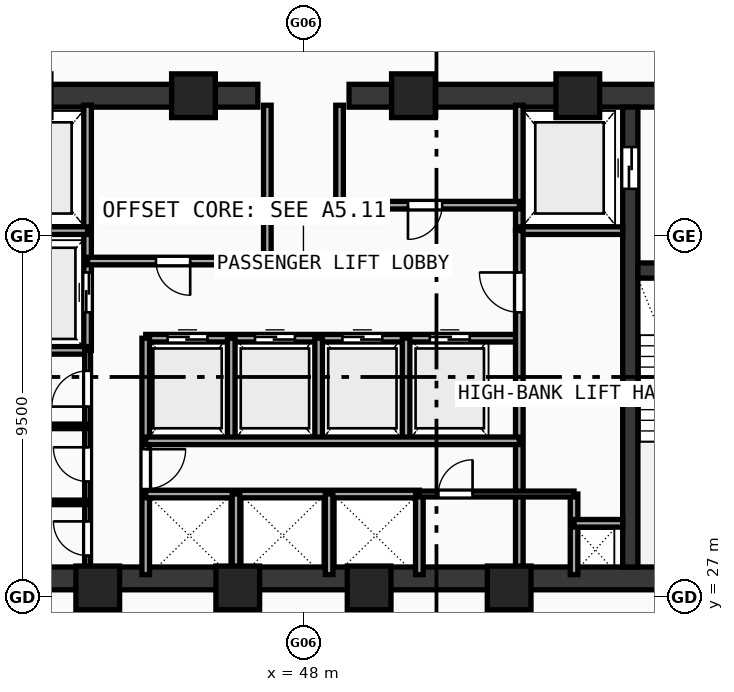
"""IFC4 building model, lengths in metres.
Left out: names, types, materials, properties, quantities, classifications, styles, units other than length and angle.
Written with IfcOpenShell. Run it as: python <this file> out.ifc"""

import sys

from ifc_helpers import new_model, si_unit, direction, frame, frame_2d, origin, origin_with_axes, origin_2d, place, context, subcontext, project, spatial, rectangle, hollow_rectangle, extrude, source, transform, mapped, element, fill, save


model = new_model("IFC4")
c1 = context("Model", 3, precision=1e-05, world=origin(), true_north=direction((0.0, 1.0)))
c2 = subcontext(c1, "Body", "Model", "MODEL_VIEW")
j1 = project(units=[si_unit("LENGTHUNIT", "METRE"), si_unit("PLANEANGLEUNIT", "RADIAN")], contexts=[c1])
p1 = place(None, origin())
s1 = spatial("IfcSite", under=j1, at=p1, CompositionType="ELEMENT")
p2 = place(p1, origin())
s2 = spatial("IfcBuilding", under=s1, at=p2, CompositionType="ELEMENT")
p3 = place(p2, frame((0.0, 0.0, 144.55)))
s3 = spatial("IfcBuildingStorey", under=s2, at=p3, CompositionType="ELEMENT", Elevation=144.55)
p4 = place(p3, frame((35.5, 27.5, 0.0), z_axis=(0.0, 0.0, 1.0), x_axis=(1.0, 0.0, 0.0)))
e1 = element("IfcWall", 1, at=p4, inside=s3, PredefinedType="SHEAR", context=c2, shape_type="SweptSolid", body=[
    extrude(rectangle(XDim=25.0, YDim=0.6, at=frame_2d((12.5, 0.0))), origin(), (0.0, 0.0, 1.0), 3.42),
])
p5 = place(p3, frame((35.5, 40.2, 0.0), z_axis=(0.0, 0.0, 1.0), x_axis=(1.0, 0.0, 0.0)))
e2 = element("IfcWall", 2, at=p5, inside=s3, PredefinedType="SHEAR", context=c2, shape_type="SweptSolid", body=[
    extrude(rectangle(XDim=11.3, YDim=0.6, at=frame_2d((5.65, 0.0))), origin(), (0.0, 0.0, 1.0), 3.42),
])
p6 = place(p5, frame((1.65, 0.0, 0.0)))
e3 = element("IfcOpeningElement", 3, at=p6, cuts=e2, PredefinedType="OPENING", context=c2, shape_type="SweptSolid", body=[
    extrude(rectangle(XDim=1.05, YDim=2.1, at=frame_2d((0.525, 1.05))), frame((0.0, 0.31, 0.0), z_axis=(0.0, -1.0, 0.0), x_axis=(1.0, 0.0, 0.0)), (0.0, 0.0, 1.0), 0.62),
])
p7 = place(p3, frame((49.2, 40.2, 0.0), z_axis=(0.0, 0.0, 1.0), x_axis=(1.0, 0.0, 0.0)))
e4 = element("IfcWall", 4, at=p7, inside=s3, PredefinedType="SHEAR", context=c2, shape_type="SweptSolid", body=[
    extrude(rectangle(XDim=11.3, YDim=0.6, at=frame_2d((5.65, 0.0))), origin(), (0.0, 0.0, 1.0), 3.42),
])
p8 = place(p7, frame((8.6, 0.0, 0.0)))
e5 = element("IfcOpeningElement", 5, at=p8, cuts=e4, PredefinedType="OPENING", context=c2, shape_type="SweptSolid", body=[
    extrude(rectangle(XDim=1.05, YDim=2.1, at=frame_2d((0.525, 1.05))), frame((0.0, 0.31, 0.0), z_axis=(0.0, -1.0, 0.0), x_axis=(1.0, 0.0, 0.0)), (0.0, 0.0, 1.0), 0.62),
])
p9 = place(p3, frame((56.6, 27.8, 0.0), z_axis=(0.0, 0.0, 1.0), x_axis=(0.0, 1.0, 0.0)))
e6 = element("IfcWall", 6, at=p9, inside=s3, PredefinedType="SHEAR", context=c2, shape_type="SweptSolid", body=[
    extrude(rectangle(XDim=12.1, YDim=0.4, at=frame_2d((6.05, 0.0))), origin(), (0.0, 0.0, 1.0), 3.42),
])
p10 = place(p9, frame((9.95, 0.0, 0.0)))
e7 = element("IfcOpeningElement", 7, at=p10, cuts=e6, PredefinedType="OPENING", context=c2, shape_type="SweptSolid", body=[
    extrude(rectangle(XDim=1.1, YDim=2.1, at=frame_2d((0.55, 1.05))), frame((0.0, 0.21, 0.0), z_axis=(0.0, -1.0, 0.0), x_axis=(1.0, 0.0, 0.0)), (0.0, 0.0, 1.0), 0.42),
])
p11 = place(p3, frame((56.8, 35.6, 0.0), z_axis=(0.0, 0.0, 1.0), x_axis=(1.0, 0.0, 0.0)))
e8 = element("IfcWall", 8, at=p11, inside=s3, PredefinedType="SHEAR", context=c2, shape_type="SweptSolid", body=[
    extrude(rectangle(XDim=3.1, YDim=0.4, at=frame_2d((1.55, 0.0))), origin(), (0.0, 0.0, 1.0), 3.42),
])
p12 = place(p11, frame((1.02, 0.0, 0.0)))
e9 = element("IfcOpeningElement", 9, at=p12, cuts=e8, PredefinedType="OPENING", context=c2, shape_type="SweptSolid", body=[
    extrude(rectangle(XDim=1.05, YDim=2.1, at=frame_2d((0.525, 1.05))), frame((0.0, 0.21, 0.0), z_axis=(0.0, -1.0, 0.0), x_axis=(1.0, 0.0, 0.0)), (0.0, 0.0, 1.0), 0.42),
])
m1 = source(origin(), c2, "Body", "SweptSolid", [
    extrude(hollow_rectangle(XDim=1.15, YDim=1.15, WallThickness=0.048, at=origin_2d()), origin(), (0.0, 0.0, 1.0), 3.68),
])
for number, where, z_axis, x_axis in (
    (10, (42.588, 27.25, -0.26), (0.0, 0.0, 1.0), (1.0, 0.0, 0.0)),
    (11, (46.272, 27.25, -0.26), (0.0, 0.0, 1.0), (1.0, 0.0, 0.0)),
    (12, (49.729, 27.25, -0.26), (0.0, 0.0, 1.0), (1.0, 0.0, 0.0)),
    (13, (53.412, 27.25, -0.26), (0.0, 0.0, 1.0), (1.0, 0.0, 0.0)),
    (14, (55.219, 40.2, -0.26), (0.0, 0.0, 1.0), (1.0, 0.0, 0.0)),
    (15, (50.894, 40.2, -0.26), (0.0, 0.0, 1.0), (1.0, 0.0, 0.0)),
    (16, (45.106, 40.2, -0.26), (0.0, 0.0, 1.0), (1.0, 0.0, 0.0)),
):
    element("IfcColumn", number, at=place(p3, frame(where, z_axis=z_axis, x_axis=x_axis)), inside=s3, PredefinedType="COLUMN", context=c2, shape_type="MappedRepresentation", body=[
        mapped(m1, transform((0.0, 0.0, 0.0), scale=1.0)),
    ])
p13 = place(p3, frame((42.32, 33.5, 0.0), z_axis=(0.0, 0.0, 1.0), x_axis=(0.0, 1.0, 0.0)))
e17 = element("IfcWall", 17, at=p13, inside=s3, PredefinedType="SOLIDWALL", context=c2, shape_type="SweptSolid", body=[
    extrude(rectangle(XDim=6.45, YDim=0.2, at=frame_2d((3.225, 0.0))), origin(), (0.0, 0.0, 1.0), 3.42),
])
p14 = place(p13, frame((1.0, 0.0, 0.0)))
e18 = element("IfcOpeningElement", 18, at=p14, cuts=e17, PredefinedType="OPENING", context=c2, shape_type="SweptSolid", body=[
    extrude(rectangle(XDim=1.05, YDim=2.1, at=frame_2d((0.525, 1.05))), frame((0.0, 0.11, 0.0), z_axis=(0.0, -1.0, 0.0), x_axis=(1.0, 0.0, 0.0)), (0.0, 0.0, 1.0), 0.22),
])
for number, where, z_axis, x_axis in (
    (19, (39.6, 36.65, 0.0), (0.0, 0.0, 1.0), (1.0, 0.0, 0.0)),
    (20, (39.6, 33.5, 0.0), (0.0, 0.0, 1.0), (1.0, 0.0, 0.0)),
):
    element("IfcWall", number, at=place(p3, frame(where, z_axis=z_axis, x_axis=x_axis)), inside=s3, PredefinedType="SOLIDWALL", context=c2, shape_type="SweptSolid", body=[
        extrude(rectangle(XDim=2.72, YDim=0.2, at=frame_2d((1.36, 0.0))), origin(), (0.0, 0.0, 1.0), 3.42),
    ])
p15 = place(p3, frame((53.68, 36.65, 0.0), z_axis=(0.0, 0.0, 1.0), x_axis=(0.0, 1.0, 0.0)))
e21 = element("IfcWall", 21, at=p15, inside=s3, PredefinedType="SOLIDWALL", context=c2, shape_type="SweptSolid", body=[
    extrude(rectangle(XDim=3.3, YDim=0.2, at=frame_2d((1.65, 0.0))), origin(), (0.0, 0.0, 1.0), 3.42),
])
p16 = place(p3, frame((53.68, 36.65, 0.0), z_axis=(0.0, 0.0, 1.0), x_axis=(1.0, 0.0, 0.0)))
e22 = element("IfcWall", 22, at=p16, inside=s3, PredefinedType="SOLIDWALL", context=c2, shape_type="SweptSolid", body=[
    extrude(rectangle(XDim=2.72, YDim=0.2, at=frame_2d((1.36, 0.0))), origin(), (0.0, 0.0, 1.0), 3.42),
])
p17 = place(p3, frame((42.32, 35.85, 0.0), z_axis=(0.0, 0.0, 1.0), x_axis=(1.0, 0.0, 0.0)))
e23 = element("IfcWall", 23, at=p17, inside=s3, PredefinedType="SOLIDWALL", context=c2, shape_type="SweptSolid", body=[
    extrude(rectangle(XDim=4.73, YDim=0.2, at=frame_2d((2.365, 0.0))), origin(), (0.0, 0.0, 1.0), 3.42),
])
p18 = place(p17, frame((1.8, 0.0, 0.0)))
e24 = element("IfcOpeningElement", 24, at=p18, cuts=e23, PredefinedType="OPENING", context=c2, shape_type="SweptSolid", body=[
    extrude(rectangle(XDim=0.9, YDim=2.1, at=frame_2d((0.45, 1.05))), frame((0.0, 0.11, 0.0), z_axis=(0.0, -1.0, 0.0), x_axis=(1.0, 0.0, 0.0)), (0.0, 0.0, 1.0), 0.22),
])
p19 = place(p3, frame((48.95, 37.32, 0.0), z_axis=(0.0, 0.0, 1.0), x_axis=(1.0, 0.0, 0.0)))
e25 = element("IfcWall", 25, at=p19, inside=s3, PredefinedType="SOLIDWALL", context=c2, shape_type="SweptSolid", body=[
    extrude(rectangle(XDim=4.73, YDim=0.2, at=frame_2d((2.365, 0.0))), origin(), (0.0, 0.0, 1.0), 3.42),
])
p20 = place(p19, frame((1.8, 0.0, 0.0)))
e26 = element("IfcOpeningElement", 26, at=p20, cuts=e25, PredefinedType="OPENING", context=c2, shape_type="SweptSolid", body=[
    extrude(rectangle(XDim=0.9, YDim=2.1, at=frame_2d((0.45, 1.05))), frame((0.0, 0.11, 0.0), z_axis=(0.0, -1.0, 0.0), x_axis=(1.0, 0.0, 0.0)), (0.0, 0.0, 1.0), 0.22),
])
p21 = place(p3, frame((47.05, 35.85, 0.0), z_axis=(0.0, 0.0, 1.0), x_axis=(0.0, 1.0, 0.0)))
e27 = element("IfcWall", 27, at=p21, inside=s3, PredefinedType="SOLIDWALL", context=c2, shape_type="SweptSolid", body=[
    extrude(rectangle(XDim=4.1, YDim=0.2, at=frame_2d((2.05, 0.0))), origin(), (0.0, 0.0, 1.0), 3.42),
])
p22 = place(p3, frame((48.95, 37.32, 0.0), z_axis=(0.0, 0.0, 1.0), x_axis=(0.0, 1.0, 0.0)))
e28 = element("IfcWall", 28, at=p22, inside=s3, PredefinedType="SOLIDWALL", context=c2, shape_type="SweptSolid", body=[
    extrude(rectangle(XDim=2.63, YDim=0.2, at=frame_2d((1.315, 0.0))), origin(), (0.0, 0.0, 1.0), 3.42),
])
p23 = place(p3, frame((43.85, 33.82, 0.0), z_axis=(0.0, 0.0, 1.0), x_axis=(1.0, 0.0, 0.0)))
e29 = element("IfcWall", 29, at=p23, inside=s3, PredefinedType="SOLIDWALL", context=c2, shape_type="SweptSolid", body=[
    extrude(rectangle(XDim=9.83, YDim=0.2, at=frame_2d((4.915, 0.0))), origin(), (0.0, 0.0, 1.0), 3.42),
])
p24 = place(p23, frame((0.575, 0.0, 0.0)))
e30 = element("IfcOpeningElement", 30, at=p24, cuts=e29, PredefinedType="OPENING", context=c2, shape_type="SweptSolid", body=[
    extrude(rectangle(XDim=1.05, YDim=2.1, at=frame_2d((0.525, 1.05))), frame((0.0, 0.11, 0.0), z_axis=(0.0, -1.0, 0.0), x_axis=(1.0, 0.0, 0.0)), (0.0, 0.0, 1.0), 0.22),
])
p25 = place(p23, frame((2.875, 0.0, 0.0)))
e31 = element("IfcOpeningElement", 31, at=p25, cuts=e29, PredefinedType="OPENING", context=c2, shape_type="SweptSolid", body=[
    extrude(rectangle(XDim=1.05, YDim=2.1, at=frame_2d((0.525, 1.05))), frame((0.0, 0.11, 0.0), z_axis=(0.0, -1.0, 0.0), x_axis=(1.0, 0.0, 0.0)), (0.0, 0.0, 1.0), 0.22),
])
p26 = place(p23, frame((5.175, 0.0, 0.0)))
e32 = element("IfcOpeningElement", 32, at=p26, cuts=e29, PredefinedType="OPENING", context=c2, shape_type="SweptSolid", body=[
    extrude(rectangle(XDim=1.05, YDim=2.1, at=frame_2d((0.525, 1.05))), frame((0.0, 0.11, 0.0), z_axis=(0.0, -1.0, 0.0), x_axis=(1.0, 0.0, 0.0)), (0.0, 0.0, 1.0), 0.22),
])
p27 = place(p23, frame((7.475, 0.0, 0.0)))
e33 = element("IfcOpeningElement", 33, at=p27, cuts=e29, PredefinedType="OPENING", context=c2, shape_type="SweptSolid", body=[
    extrude(rectangle(XDim=1.05, YDim=2.1, at=frame_2d((0.525, 1.05))), frame((0.0, 0.11, 0.0), z_axis=(0.0, -1.0, 0.0), x_axis=(1.0, 0.0, 0.0)), (0.0, 0.0, 1.0), 0.22),
])
p28 = place(p3, frame((43.85, 27.6, 0.0), z_axis=(0.0, 0.0, 1.0), x_axis=(0.0, 1.0, 0.0)))
e34 = element("IfcWall", 34, at=p28, inside=s3, PredefinedType="SOLIDWALL", context=c2, shape_type="SweptSolid", body=[
    extrude(rectangle(XDim=6.22, YDim=0.2, at=frame_2d((3.11, 0.0))), origin(), (0.0, 0.0, 1.0), 3.42),
])
p29 = place(p28, frame((2.25, 0.0, 0.0)))
e35 = element("IfcOpeningElement", 35, at=p29, cuts=e34, PredefinedType="OPENING", context=c2, shape_type="SweptSolid", body=[
    extrude(rectangle(XDim=1.05, YDim=2.1, at=frame_2d((0.525, 1.05))), frame((0.0, 0.11, 0.0), z_axis=(0.0, -1.0, 0.0), x_axis=(1.0, 0.0, 0.0)), (0.0, 0.0, 1.0), 0.22),
])
p30 = place(p3, frame((53.68, 27.6, 0.0), z_axis=(0.0, 0.0, 1.0), x_axis=(0.0, 1.0, 0.0)))
e36 = element("IfcWall", 36, at=p30, inside=s3, PredefinedType="SOLIDWALL", context=c2, shape_type="SweptSolid", body=[
    extrude(rectangle(XDim=9.05, YDim=0.2, at=frame_2d((4.525, 0.0))), origin(), (0.0, 0.0, 1.0), 3.42),
])
p31 = place(p30, frame((6.9, 0.0, 0.0)))
e37 = element("IfcOpeningElement", 37, at=p31, cuts=e36, PredefinedType="OPENING", context=c2, shape_type="SweptSolid", body=[
    extrude(rectangle(XDim=1.05, YDim=2.1, at=frame_2d((0.525, 1.05))), frame((0.0, 0.11, 0.0), z_axis=(0.0, -1.0, 0.0), x_axis=(1.0, 0.0, 0.0)), (0.0, 0.0, 1.0), 0.22),
])
for number, where, z_axis, x_axis in (
    (38, (46.1, 31.12, 0.0), (0.0, 0.0, 1.0), (0.0, 1.0, 0.0)),
    (39, (48.4, 31.12, 0.0), (0.0, 0.0, 1.0), (0.0, 1.0, 0.0)),
    (40, (50.7, 31.12, 0.0), (0.0, 0.0, 1.0), (0.0, 1.0, 0.0)),
):
    element("IfcWall", number, at=place(p3, frame(where, z_axis=z_axis, x_axis=x_axis)), inside=s3, PredefinedType="SOLIDWALL", context=c2, shape_type="SweptSolid", body=[
        extrude(rectangle(XDim=2.7, YDim=0.2, at=frame_2d((1.35, 0.0))), origin(), (0.0, 0.0, 1.0), 3.42),
    ])
p32 = place(p3, frame((43.85, 29.72, 0.0), z_axis=(0.0, 0.0, 1.0), x_axis=(1.0, 0.0, 0.0)))
e41 = element("IfcWall", 41, at=p32, inside=s3, PredefinedType="SOLIDWALL", context=c2, shape_type="SweptSolid", body=[
    extrude(rectangle(XDim=7.2, YDim=0.2, at=frame_2d((3.6, 0.0))), origin(), (0.0, 0.0, 1.0), 3.42),
])
p33 = place(p3, frame((51.05, 27.6, 0.0), z_axis=(0.0, 0.0, 1.0), x_axis=(0.0, 1.0, 0.0)))
e42 = element("IfcWall", 42, at=p33, inside=s3, PredefinedType="SOLIDWALL", context=c2, shape_type="SweptSolid", body=[
    extrude(rectangle(XDim=2.12, YDim=0.2, at=frame_2d((1.06, 0.0))), origin(), (0.0, 0.0, 1.0), 3.42),
])
p34 = place(p3, frame((43.85, 31.12, 0.0), z_axis=(0.0, 0.0, 1.0), x_axis=(1.0, 0.0, 0.0)))
e43 = element("IfcWall", 43, at=p34, inside=s3, PredefinedType="SOLIDWALL", context=c2, shape_type="SweptSolid", body=[
    extrude(rectangle(XDim=9.83, YDim=0.2, at=frame_2d((4.915, 0.0))), origin(), (0.0, 0.0, 1.0), 3.42),
])
for number, where, z_axis, x_axis in (
    (44, (46.225, 27.6, 0.0), (0.0, 0.0, 1.0), (0.0, 1.0, 0.0)),
    (45, (48.675, 27.6, 0.0), (0.0, 0.0, 1.0), (0.0, 1.0, 0.0)),
    (46, (55.12, 27.6, 0.0), (0.0, 0.0, 1.0), (0.0, 1.0, 0.0)),
):
    element("IfcWall", number, at=place(p3, frame(where, z_axis=z_axis, x_axis=x_axis)), inside=s3, PredefinedType="SOLIDWALL", context=c2, shape_type="SweptSolid", body=[
        extrude(rectangle(XDim=2.12, YDim=0.2, at=frame_2d((1.06, 0.0))), origin(), (0.0, 0.0, 1.0), 3.42),
    ])
p35 = place(p3, frame((55.12, 28.95, 0.0), z_axis=(0.0, 0.0, 1.0), x_axis=(1.0, 0.0, 0.0)))
e47 = element("IfcWall", 47, at=p35, inside=s3, PredefinedType="SOLIDWALL", context=c2, shape_type="SweptSolid", body=[
    extrude(rectangle(XDim=1.28, YDim=0.2, at=frame_2d((0.64, 0.0))), origin(), (0.0, 0.0, 1.0), 3.42),
])
p36 = place(p3, frame((42.32, 27.6, 0.0), z_axis=(0.0, 0.0, 1.0), x_axis=(0.0, 1.0, 0.0)))
e48 = element("IfcWall", 48, at=p36, inside=s3, PredefinedType="PARTITIONING", context=c2, shape_type="SweptSolid", body=[
    extrude(rectangle(XDim=5.9, YDim=0.155, at=frame_2d((2.95, 0.0))), origin(), (0.0, 0.0, 1.0), 3.42),
])
p37 = place(p36, frame((0.5, 0.0, 0.0)))
e49 = element("IfcOpeningElement", 49, at=p37, cuts=e48, PredefinedType="OPENING", context=c2, shape_type="SweptSolid", body=[
    extrude(rectangle(XDim=0.9, YDim=2.1, at=frame_2d((0.45, 1.05))), frame((0.0, 0.087, 0.0), z_axis=(0.0, -1.0, 0.0), x_axis=(1.0, 0.0, 0.0)), (0.0, 0.0, 1.0), 0.175),
])
p38 = place(p36, frame((2.45, 0.0, 0.0)))
e50 = element("IfcOpeningElement", 50, at=p38, cuts=e48, PredefinedType="OPENING", context=c2, shape_type="SweptSolid", body=[
    extrude(rectangle(XDim=0.9, YDim=2.1, at=frame_2d((0.45, 1.05))), frame((0.0, 0.087, 0.0), z_axis=(0.0, -1.0, 0.0), x_axis=(1.0, 0.0, 0.0)), (0.0, 0.0, 1.0), 0.175),
])
p39 = place(p36, frame((4.42, 0.0, 0.0)))
e51 = element("IfcOpeningElement", 51, at=p39, cuts=e48, PredefinedType="OPENING", context=c2, shape_type="SweptSolid", body=[
    extrude(rectangle(XDim=0.94, YDim=2.1, at=frame_2d((0.47, 1.05))), frame((0.0, 0.087, 0.0), z_axis=(0.0, -1.0, 0.0), x_axis=(1.0, 0.0, 0.0)), (0.0, 0.0, 1.0), 0.175),
])
p40 = place(p3, frame((51.05, 29.72, 0.0), z_axis=(0.0, 0.0, 1.0), x_axis=(1.0, 0.0, 0.0)))
e52 = element("IfcWall", 52, at=p40, inside=s3, PredefinedType="PARTITIONING", context=c2, shape_type="SweptSolid", body=[
    extrude(rectangle(XDim=4.07, YDim=0.155, at=frame_2d((2.035, 0.0))), origin(), (0.0, 0.0, 1.0), 3.42),
])
p41 = place(p40, frame((0.5, 0.0, 0.0)))
e53 = element("IfcOpeningElement", 53, at=p41, cuts=e52, PredefinedType="OPENING", context=c2, shape_type="SweptSolid", body=[
    extrude(rectangle(XDim=0.9, YDim=2.1, at=frame_2d((0.45, 1.05))), frame((0.0, 0.087, 0.0), z_axis=(0.0, -1.0, 0.0), x_axis=(1.0, 0.0, 0.0)), (0.0, 0.0, 1.0), 0.175),
])
for number, where, z_axis, x_axis in (
    (54, (39.6, 29.5, 0.0), (0.0, 0.0, 1.0), (1.0, 0.0, 0.0)),
    (55, (39.6, 31.5, 0.0), (0.0, 0.0, 1.0), (1.0, 0.0, 0.0)),
):
    element("IfcWall", number, at=place(p3, frame(where, z_axis=z_axis, x_axis=x_axis)), inside=s3, PredefinedType="PARTITIONING", context=c2, shape_type="SweptSolid", body=[
        extrude(rectangle(XDim=2.72, YDim=0.12, at=frame_2d((1.36, 0.0))), origin(), (0.0, 0.0, 1.0), 3.42),
    ])
m2 = source(origin(), c2, "Body", "SweptSolid", [
    extrude(rectangle(XDim=1.1, YDim=2.1, at=frame_2d((0.55, 1.05))), frame((0.0, 0.025, 0.0), z_axis=(0.0, -1.0, 0.0), x_axis=(1.0, 0.0, 0.0)), (0.0, 0.0, 1.0), 0.05),
])
p42 = place(p10, origin_with_axes())
e56 = element("IfcDoor", 56, at=p42, inside=s3, OperationType="DOUBLE_DOOR_SLIDING", PredefinedType="DOOR", context=c2, shape_type="MappedRepresentation", body=[
    mapped(m2, transform((0.0, 0.0, 0.0), scale=1.0)),
])
fill(e7, e56)
m3 = source(origin(), c2, "Body", "SweptSolid", [
    extrude(rectangle(XDim=1.05, YDim=2.1, at=frame_2d((0.525, 1.05))), frame((0.0, 0.025, 0.0), z_axis=(0.0, -1.0, 0.0), x_axis=(1.0, 0.0, 0.0)), (0.0, 0.0, 1.0), 0.05),
])
p43 = place(p14, origin_with_axes())
e57 = element("IfcDoor", 57, at=p43, inside=s3, OperationType="DOUBLE_DOOR_SLIDING", PredefinedType="DOOR", context=c2, shape_type="MappedRepresentation", body=[
    mapped(m3, transform((0.0, 0.0, 0.0), scale=1.0)),
])
fill(e18, e57)
m4 = source(origin(), c2, "Body", "SweptSolid", [
    extrude(rectangle(XDim=0.9, YDim=2.1, at=frame_2d((0.45, 1.05))), frame((0.0, 0.025, 0.0), z_axis=(0.0, -1.0, 0.0), x_axis=(1.0, 0.0, 0.0)), (0.0, 0.0, 1.0), 0.05),
])
p44 = place(p18, frame((0.9, 0.0, 0.0), z_axis=(0.0, 0.0, 1.0), x_axis=(-1.0, 0.0, 0.0)))
e58 = element("IfcDoor", 58, at=p44, inside=s3, OperationType="SINGLE_SWING_LEFT", PredefinedType="DOOR", context=c2, shape_type="MappedRepresentation", body=[
    mapped(m4, transform((0.0, 0.0, 0.0), scale=1.0)),
])
fill(e24, e58)
p45 = place(p20, frame((0.9, 0.0, 0.0), z_axis=(0.0, 0.0, 1.0), x_axis=(-1.0, 0.0, 0.0)))
e59 = element("IfcDoor", 59, at=p45, inside=s3, OperationType="SINGLE_SWING_RIGHT", PredefinedType="DOOR", context=c2, shape_type="MappedRepresentation", body=[
    mapped(m4, transform((0.0, 0.0, 0.0), scale=1.0)),
])
fill(e26, e59)
p46 = place(p24, origin_with_axes())
e60 = element("IfcDoor", 60, at=p46, inside=s3, OperationType="DOUBLE_DOOR_SLIDING", PredefinedType="DOOR", context=c2, shape_type="MappedRepresentation", body=[
    mapped(m3, transform((0.0, 0.0, 0.0), scale=1.0)),
])
fill(e30, e60)
p47 = place(p25, origin_with_axes())
e61 = element("IfcDoor", 61, at=p47, inside=s3, OperationType="DOUBLE_DOOR_SLIDING", PredefinedType="DOOR", context=c2, shape_type="MappedRepresentation", body=[
    mapped(m3, transform((0.0, 0.0, 0.0), scale=1.0)),
])
fill(e31, e61)
p48 = place(p26, origin_with_axes())
e62 = element("IfcDoor", 62, at=p48, inside=s3, OperationType="DOUBLE_DOOR_SLIDING", PredefinedType="DOOR", context=c2, shape_type="MappedRepresentation", body=[
    mapped(m3, transform((0.0, 0.0, 0.0), scale=1.0)),
])
fill(e32, e62)
p49 = place(p27, origin_with_axes())
e63 = element("IfcDoor", 63, at=p49, inside=s3, OperationType="DOUBLE_DOOR_SLIDING", PredefinedType="DOOR", context=c2, shape_type="MappedRepresentation", body=[
    mapped(m3, transform((0.0, 0.0, 0.0), scale=1.0)),
])
fill(e33, e63)
p50 = place(p29, frame((1.05, 0.0, 0.0), z_axis=(0.0, 0.0, 1.0), x_axis=(-1.0, 0.0, 0.0)))
e64 = element("IfcDoor", 64, at=p50, inside=s3, OperationType="SINGLE_SWING_LEFT", PredefinedType="DOOR", context=c2, shape_type="MappedRepresentation", body=[
    mapped(m3, transform((0.0, 0.0, 0.0), scale=1.0)),
])
fill(e35, e64)
p51 = place(p31, origin_with_axes())
e65 = element("IfcDoor", 65, at=p51, inside=s3, OperationType="SINGLE_SWING_RIGHT", PredefinedType="DOOR", context=c2, shape_type="MappedRepresentation", body=[
    mapped(m3, transform((0.0, 0.0, 0.0), scale=1.0)),
])
fill(e37, e65)
p52 = place(p37, origin_with_axes())
e66 = element("IfcDoor", 66, at=p52, inside=s3, OperationType="SINGLE_SWING_RIGHT", PredefinedType="DOOR", context=c2, shape_type="MappedRepresentation", body=[
    mapped(m4, transform((0.0, 0.0, 0.0), scale=1.0)),
])
fill(e49, e66)
p53 = place(p38, origin_with_axes())
e67 = element("IfcDoor", 67, at=p53, inside=s3, OperationType="SINGLE_SWING_RIGHT", PredefinedType="DOOR", context=c2, shape_type="MappedRepresentation", body=[
    mapped(m4, transform((0.0, 0.0, 0.0), scale=1.0)),
])
fill(e50, e67)
m5 = source(origin(), c2, "Body", "SweptSolid", [
    extrude(rectangle(XDim=0.94, YDim=2.1, at=frame_2d((0.47, 1.05))), frame((0.0, 0.025, 0.0), z_axis=(0.0, -1.0, 0.0), x_axis=(1.0, 0.0, 0.0)), (0.0, 0.0, 1.0), 0.05),
])
p54 = place(p39, origin_with_axes())
e68 = element("IfcDoor", 68, at=p54, inside=s3, OperationType="SINGLE_SWING_LEFT", PredefinedType="DOOR", context=c2, shape_type="MappedRepresentation", body=[
    mapped(m5, transform((0.0, 0.0, 0.0), scale=1.0)),
])
fill(e51, e68)
p55 = place(p41, origin_with_axes())
e69 = element("IfcDoor", 69, at=p55, inside=s3, OperationType="SINGLE_SWING_RIGHT", PredefinedType="DOOR", context=c2, shape_type="MappedRepresentation", body=[
    mapped(m4, transform((0.0, 0.0, 0.0), scale=1.0)),
])
fill(e53, e69)
save(model, sys.argv[1])
